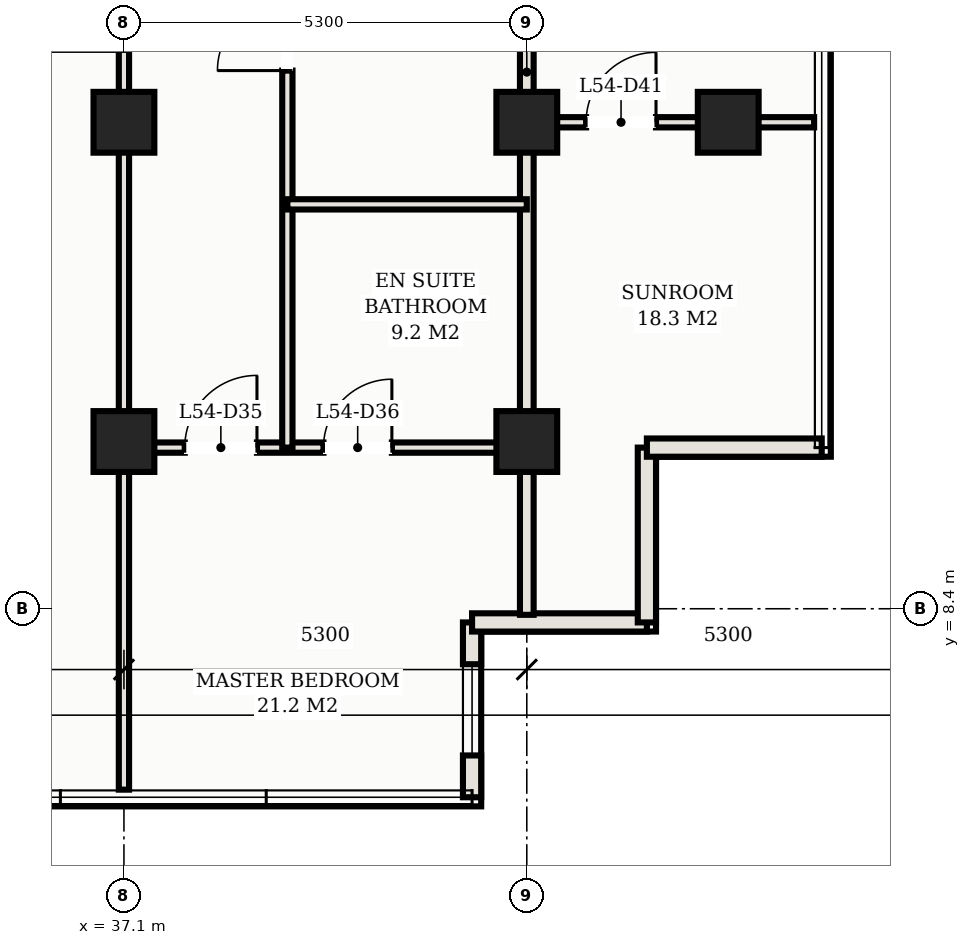
"""IFC4 building model, lengths in metres.
Left out: names, types, materials, properties, quantities, classifications, styles, units other than length and angle.
Written with IfcOpenShell. Run it as: python <this file> out.ifc"""

import sys

from ifc_helpers import new_model, si_unit, direction, frame, frame_2d, origin, origin_2d, place, context, subcontext, project, spatial, rectangle, hollow_rectangle, extrude, element, fill, save


model = new_model("IFC4")
c1 = context("Model", 3, precision=1e-05, world=origin(), true_north=direction((0.0, 1.0)))
c2 = subcontext(c1, "Body", "Model", "MODEL_VIEW")
j1 = project(units=[si_unit("LENGTHUNIT", "METRE"), si_unit("PLANEANGLEUNIT", "RADIAN")], contexts=[c1])
p1 = place(None, origin())
s1 = spatial("IfcSite", under=j1, at=p1, CompositionType="ELEMENT")
p2 = place(p1, origin())
s2 = spatial("IfcBuilding", under=s1, at=p2, CompositionType="ELEMENT")
p3 = place(p2, frame((0.0, 0.0, 200.0)))
s3 = spatial("IfcBuildingStorey", under=s2, at=p3, CompositionType="ELEMENT", Elevation=200.0)
for number, where, z_axis, x_axis in (
    (1, (37.1, 14.8, 0.0), (0.0, 0.0, 1.0), (1.0, 0.0, 0.0)),
    (2, (37.1, 10.6, 0.0), (0.0, 0.0, 1.0), (1.0, 0.0, 0.0)),
    (3, (42.4, 14.8, 0.0), (0.0, 0.0, 1.0), (1.0, 0.0, 0.0)),
    (4, (42.4, 10.6, 0.0), (0.0, 0.0, 1.0), (1.0, 0.0, 0.0)),
    (5, (45.05, 14.8, 0.0), (0.0, 0.0, 1.0), (1.0, 0.0, 0.0)),
):
    element("IfcColumn", number, at=place(p3, frame(where, z_axis=z_axis, x_axis=x_axis)), inside=s3, PredefinedType="COLUMN", context=c2, shape_type="SweptSolid", body=[
        extrude(hollow_rectangle(XDim=0.8, YDim=0.8, WallThickness=0.028, at=origin_2d()), origin(), (0.0, 0.0, 1.0), 3.3),
    ])
p4 = place(p3, frame((41.68, 5.92, 0.0), z_axis=(0.0, 0.0, 1.0), x_axis=(0.0, 1.0, 0.0)))
e6 = element("IfcWall", 6, at=p4, inside=s3, PredefinedType="SOLIDWALL", context=c2, shape_type="SweptSolid", body=[
    extrude(rectangle(XDim=2.3, YDim=0.24, at=frame_2d((1.15, 0.0))), origin(), (0.0, 0.0, 1.0), 3.11),
])
p5 = place(p4, frame((0.55, 0.0, 0.75)))
e7 = element("IfcOpeningElement", 7, at=p5, cuts=e6, PredefinedType="OPENING", context=c2, shape_type="SweptSolid", body=[
    extrude(rectangle(XDim=1.2, YDim=1.5, at=frame_2d((0.6, 0.75))), frame((0.0, 0.13, 0.0), z_axis=(0.0, -1.0, 0.0), x_axis=(1.0, 0.0, 0.0)), (0.0, 0.0, 1.0), 0.26),
])
for number, where, z_axis, x_axis in (
    (8, (41.68, 8.22, 0.0), (0.0, 0.0, 1.0), (1.0, 0.0, 0.0)),
    (9, (43.98, 8.22, 0.0), (0.0, 0.0, 1.0), (0.0, 1.0, 0.0)),
    (10, (43.98, 10.52, 0.0), (0.0, 0.0, 1.0), (1.0, 0.0, 0.0)),
):
    element("IfcWall", number, at=place(p3, frame(where, z_axis=z_axis, x_axis=x_axis)), inside=s3, PredefinedType="SOLIDWALL", context=c2, shape_type="SweptSolid", body=[
        extrude(rectangle(XDim=2.3, YDim=0.24, at=frame_2d((1.15, 0.0))), origin(), (0.0, 0.0, 1.0), 3.11),
    ])
p6 = place(p3, frame((42.4, 8.32, 0.0), z_axis=(0.0, 0.0, 1.0), x_axis=(0.0, 1.0, 0.0)))
e11 = element("IfcWall", 11, at=p6, inside=s3, PredefinedType="PARTITIONING", context=c2, shape_type="SweptSolid", body=[
    extrude(rectangle(XDim=14.28, YDim=0.18, at=frame_2d((7.14, 0.0))), origin(), (0.0, 0.0, 1.0), 2.43),
])
p7 = place(p3, frame((37.1, 6.02, 0.0), z_axis=(0.0, 0.0, 1.0), x_axis=(0.0, 1.0, 0.0)))
e12 = element("IfcWall", 12, at=p7, inside=s3, PredefinedType="PARTITIONING", context=c2, shape_type="SweptSolid", body=[
    extrude(rectangle(XDim=16.58, YDim=0.135, at=frame_2d((8.29, 0.0))), origin(), (0.0, 0.0, 1.0), 2.43),
])
p8 = place(p7, frame((14.795, 0.0, 0.0)))
e13 = element("IfcOpeningElement", 13, at=p8, cuts=e12, PredefinedType="OPENING", context=c2, shape_type="SweptSolid", body=[
    extrude(rectangle(XDim=0.92, YDim=2.15, at=frame_2d((0.46, 1.075))), frame((0.0, 0.078, 0.0), z_axis=(0.0, -1.0, 0.0), x_axis=(1.0, 0.0, 0.0)), (0.0, 0.0, 1.0), 0.155),
])
p9 = place(p3, frame((37.1, 10.52, 0.0), z_axis=(0.0, 0.0, 1.0), x_axis=(1.0, 0.0, 0.0)))
e14 = element("IfcWall", 14, at=p9, inside=s3, PredefinedType="PARTITIONING", context=c2, shape_type="SweptSolid", body=[
    extrude(rectangle(XDim=5.3, YDim=0.135, at=frame_2d((2.65, 0.0))), origin(), (0.0, 0.0, 1.0), 2.43),
])
p10 = place(p9, frame((0.8, 0.0, 0.0)))
e15 = element("IfcOpeningElement", 15, at=p10, cuts=e14, PredefinedType="OPENING", context=c2, shape_type="SweptSolid", body=[
    extrude(rectangle(XDim=0.95, YDim=2.15, at=frame_2d((0.475, 1.075))), frame((0.0, 0.078, 0.0), z_axis=(0.0, -1.0, 0.0), x_axis=(1.0, 0.0, 0.0)), (0.0, 0.0, 1.0), 0.155),
])
p11 = place(p9, frame((2.625, 0.0, 0.0)))
e16 = element("IfcOpeningElement", 16, at=p11, cuts=e14, PredefinedType="OPENING", context=c2, shape_type="SweptSolid", body=[
    extrude(rectangle(XDim=0.9, YDim=2.15, at=frame_2d((0.45, 1.075))), frame((0.0, 0.078, 0.0), z_axis=(0.0, -1.0, 0.0), x_axis=(1.0, 0.0, 0.0)), (0.0, 0.0, 1.0), 0.155),
])
p12 = place(p3, frame((39.25, 10.52, 0.0), z_axis=(0.0, 0.0, 1.0), x_axis=(0.0, 1.0, 0.0)))
e17 = element("IfcWall", 17, at=p12, inside=s3, PredefinedType="PARTITIONING", context=c2, shape_type="SweptSolid", body=[
    extrude(rectangle(XDim=12.08, YDim=0.135, at=frame_2d((6.04, 0.0))), origin(), (0.0, 0.0, 1.0), 2.43),
])
p13 = place(p12, frame((4.96, 0.0, 0.0)))
e18 = element("IfcOpeningElement", 18, at=p13, cuts=e17, PredefinedType="OPENING", context=c2, shape_type="SweptSolid", body=[
    extrude(rectangle(XDim=0.92, YDim=2.15, at=frame_2d((0.46, 1.075))), frame((0.0, 0.078, 0.0), z_axis=(0.0, -1.0, 0.0), x_axis=(1.0, 0.0, 0.0)), (0.0, 0.0, 1.0), 0.155),
])
p14 = place(p3, frame((39.25, 13.72, 0.0), z_axis=(0.0, 0.0, 1.0), x_axis=(1.0, 0.0, 0.0)))
e19 = element("IfcWall", 19, at=p14, inside=s3, PredefinedType="PARTITIONING", context=c2, shape_type="SweptSolid", body=[
    extrude(rectangle(XDim=3.15, YDim=0.135, at=frame_2d((1.575, 0.0))), origin(), (0.0, 0.0, 1.0), 2.43),
])
p15 = place(p3, frame((42.4, 14.8, 0.0), z_axis=(0.0, 0.0, 1.0), x_axis=(1.0, 0.0, 0.0)))
e20 = element("IfcWall", 20, at=p15, inside=s3, PredefinedType="PARTITIONING", context=c2, shape_type="SweptSolid", body=[
    extrude(rectangle(XDim=3.78, YDim=0.135, at=frame_2d((1.89, 0.0))), origin(), (0.0, 0.0, 1.0), 2.43),
])
p16 = place(p15, frame((0.78, 0.0, 0.0)))
e21 = element("IfcOpeningElement", 21, at=p16, cuts=e20, PredefinedType="OPENING", context=c2, shape_type="SweptSolid", body=[
    extrude(rectangle(XDim=0.92, YDim=2.15, at=frame_2d((0.46, 1.075))), frame((0.0, 0.078, 0.0), z_axis=(0.0, -1.0, 0.0), x_axis=(1.0, 0.0, 0.0)), (0.0, 0.0, 1.0), 0.155),
])
p17 = place(p5, origin())
e22 = element("IfcWindow", 22, at=p17, inside=s3, PartitioningType="SINGLE_PANEL", PredefinedType="WINDOW", context=c2, shape_type="SweptSolid", body=[
    extrude(rectangle(XDim=1.2, YDim=1.5, at=frame_2d((0.6, 0.75))), frame((0.0, 0.03, 0.0), z_axis=(0.0, -1.0, 0.0), x_axis=(1.0, 0.0, 0.0)), (0.0, 0.0, 1.0), 0.06),
])
fill(e7, e22)
p18 = place(p10, origin())
e23 = element("IfcDoor", 23, at=p18, inside=s3, OperationType="SINGLE_SWING_RIGHT", PredefinedType="DOOR", context=c2, shape_type="SweptSolid", body=[
    extrude(rectangle(XDim=0.95, YDim=2.15, at=frame_2d((0.475, 1.075))), frame((0.0, 0.025, 0.0), z_axis=(0.0, -1.0, 0.0), x_axis=(1.0, 0.0, 0.0)), (0.0, 0.0, 1.0), 0.05),
])
fill(e15, e23)
p19 = place(p11, origin())
e24 = element("IfcDoor", 24, at=p19, inside=s3, OperationType="SINGLE_SWING_RIGHT", PredefinedType="DOOR", context=c2, shape_type="SweptSolid", body=[
    extrude(rectangle(XDim=0.9, YDim=2.15, at=frame_2d((0.45, 1.075))), frame((0.0, 0.025, 0.0), z_axis=(0.0, -1.0, 0.0), x_axis=(1.0, 0.0, 0.0)), (0.0, 0.0, 1.0), 0.05),
])
fill(e16, e24)
p20 = place(p13, origin())
e25 = element("IfcDoor", 25, at=p20, inside=s3, OperationType="SINGLE_SWING_LEFT", PredefinedType="DOOR", context=c2, shape_type="SweptSolid", body=[
    extrude(rectangle(XDim=0.92, YDim=2.15, at=frame_2d((0.46, 1.075))), frame((0.0, 0.025, 0.0), z_axis=(0.0, -1.0, 0.0), x_axis=(1.0, 0.0, 0.0)), (0.0, 0.0, 1.0), 0.05),
])
fill(e18, e25)
p21 = place(p16, origin())
e26 = element("IfcDoor", 26, at=p21, inside=s3, OperationType="SINGLE_SWING_RIGHT", PredefinedType="DOOR", context=c2, shape_type="SweptSolid", body=[
    extrude(rectangle(XDim=0.92, YDim=2.15, at=frame_2d((0.46, 1.075))), frame((0.0, 0.025, 0.0), z_axis=(0.0, -1.0, 0.0), x_axis=(1.0, 0.0, 0.0)), (0.0, 0.0, 1.0), 0.05),
])
fill(e21, e26)
save(model, sys.argv[1])
